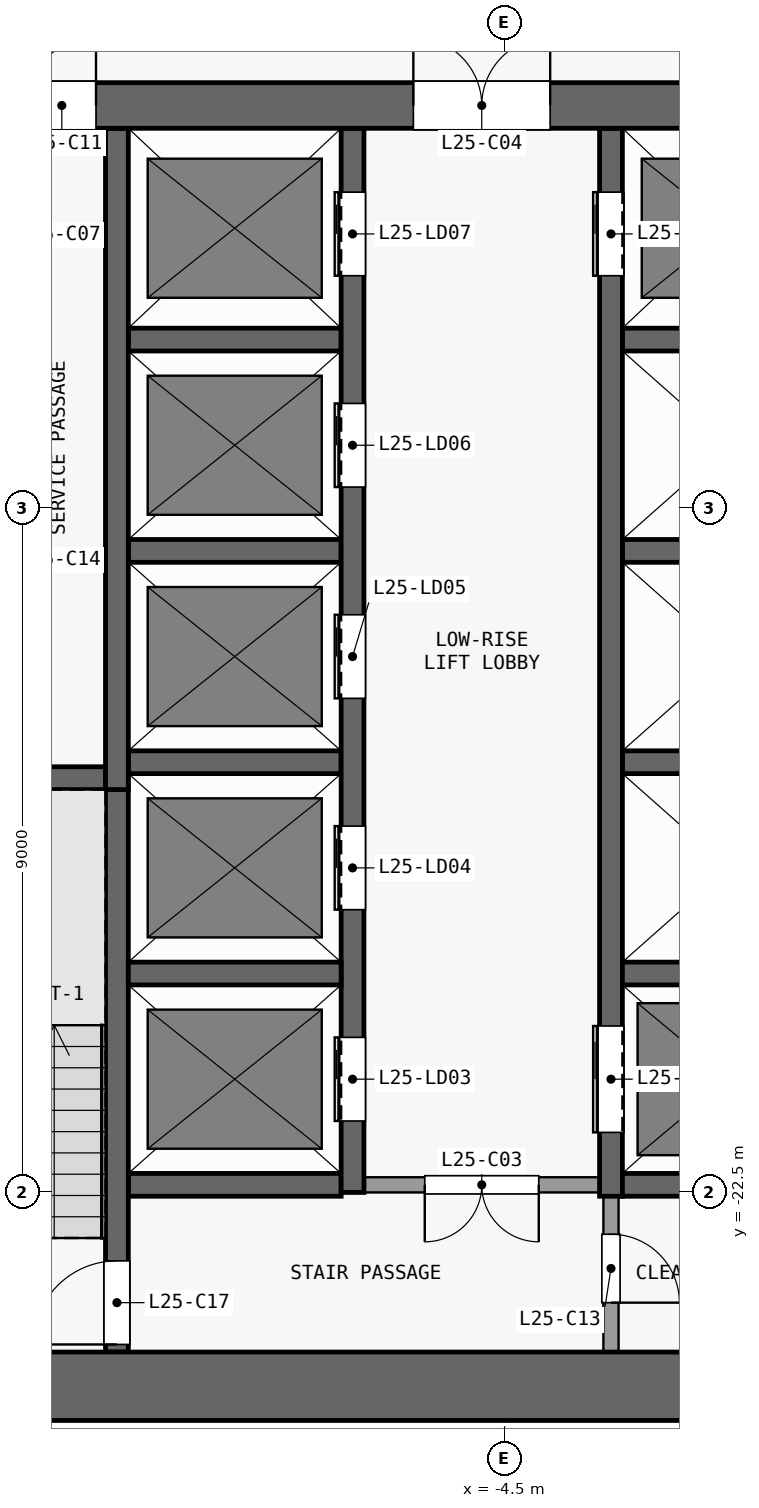
"""IFC4 building model, lengths in metres.
Left out: names, types, materials, properties, quantities, classifications, styles, units other than length and angle.
Written with IfcOpenShell. Run it as: python <this file> out.ifc"""

import sys

from ifc_helpers import new_model, si_unit, direction, frame, frame_2d, origin, place, context, subcontext, project, spatial, rectangle, extrude, element, fill, save


model = new_model("IFC4")
c1 = context("Model", 3, precision=1e-05, world=origin(), true_north=direction((0.0, 1.0)))
c2 = subcontext(c1, "Body", "Model", "MODEL_VIEW")
j1 = project(units=[si_unit("LENGTHUNIT", "METRE"), si_unit("PLANEANGLEUNIT", "RADIAN")], contexts=[c1])
p1 = place(None, origin())
s1 = spatial("IfcSite", under=j1, at=p1, CompositionType="ELEMENT")
p2 = place(p1, origin())
s2 = spatial("IfcBuilding", under=s1, at=p2, CompositionType="ELEMENT")
p3 = place(p2, frame((0.0, 0.0, 102.7)))
s3 = spatial("IfcBuildingStorey", under=s2, at=p3, CompositionType="ELEMENT", Elevation=102.7)
p4 = place(p3, frame((-13.4, -25.05, 0.0), z_axis=(0.0, 0.0, 1.0), x_axis=(1.0, 0.0, 0.0)))
e1 = element("IfcWall", 1, at=p4, inside=s3, PredefinedType="SHEAR", context=c2, shape_type="SweptSolid", body=[
    extrude(rectangle(XDim=26.8, YDim=0.9, at=frame_2d((13.4, 0.0))), origin(), (0.0, 0.0, 1.0), 3.3),
])
p5 = place(p3, frame((-13.4, -8.2, 0.0), z_axis=(0.0, 0.0, 1.0), x_axis=(1.0, 0.0, 0.0)))
e2 = element("IfcWall", 2, at=p5, inside=s3, PredefinedType="SHEAR", context=c2, shape_type="SweptSolid", body=[
    extrude(rectangle(XDim=26.8, YDim=0.6, at=frame_2d((13.4, 0.0))), origin(), (0.0, 0.0, 1.0), 3.3),
])
p6 = place(p5, frame((7.7, 0.0, 0.0)))
e3 = element("IfcOpeningElement", 3, at=p6, cuts=e2, PredefinedType="OPENING", context=c2, shape_type="SweptSolid", body=[
    extrude(rectangle(XDim=1.8, YDim=2.1, at=frame_2d((0.9, 1.05))), frame((0.0, 0.31, 0.0), z_axis=(0.0, -1.0, 0.0), x_axis=(1.0, 0.0, 0.0)), (0.0, 0.0, 1.0), 0.62),
])
p7 = place(p5, frame((17.3, 0.0, 0.0)))
e4 = element("IfcOpeningElement", 4, at=p7, cuts=e2, PredefinedType="OPENING", context=c2, shape_type="SweptSolid", body=[
    extrude(rectangle(XDim=1.8, YDim=2.1, at=frame_2d((0.9, 1.05))), frame((0.0, 0.31, 0.0), z_axis=(0.0, -1.0, 0.0), x_axis=(1.0, 0.0, 0.0)), (0.0, 0.0, 1.0), 0.62),
])
p8 = place(p5, frame((2.625, 0.0, 0.0)))
e5 = element("IfcOpeningElement", 5, at=p8, cuts=e2, PredefinedType="OPENING", context=c2, shape_type="SweptSolid", body=[
    extrude(rectangle(XDim=0.9, YDim=2.1, at=frame_2d((0.45, 1.05))), frame((0.0, 0.31, 0.0), z_axis=(0.0, -1.0, 0.0), x_axis=(1.0, 0.0, 0.0)), (0.0, 0.0, 1.0), 0.62),
])
p9 = place(p5, frame((23.275, 0.0, 0.0)))
e6 = element("IfcOpeningElement", 6, at=p9, cuts=e2, PredefinedType="OPENING", context=c2, shape_type="SweptSolid", body=[
    extrude(rectangle(XDim=0.9, YDim=2.1, at=frame_2d((0.45, 1.05))), frame((0.0, 0.31, 0.0), z_axis=(0.0, -1.0, 0.0), x_axis=(1.0, 0.0, 0.0)), (0.0, 0.0, 1.0), 0.62),
])
p10 = place(p3, frame((-9.45, -22.4, 0.0), z_axis=(0.0, 0.0, 1.0), x_axis=(1.0, 0.0, 0.0)))
e7 = element("IfcWall", 7, at=p10, inside=s3, PredefinedType="SHEAR", context=c2, shape_type="SweptSolid", body=[
    extrude(rectangle(XDim=2.8, YDim=0.3, at=frame_2d((1.4, 0.0))), origin(), (0.0, 0.0, 1.0), 3.3),
])
p11 = place(p3, frame((-3.25, -22.4, 0.0), z_axis=(0.0, 0.0, 1.0), x_axis=(-1.0, 0.0, 0.0)))
e8 = element("IfcWall", 8, at=p11, inside=s3, PredefinedType="PARTITIONING", context=c2, shape_type="SweptSolid", body=[
    extrude(rectangle(XDim=3.1, YDim=0.2, at=frame_2d((1.55, 0.0))), origin(), (0.0, 0.0, 1.0), 3.3),
])
p12 = place(p11, frame((0.8, 0.0, 0.0)))
e9 = element("IfcOpeningElement", 9, at=p12, cuts=e8, PredefinedType="OPENING", context=c2, shape_type="SweptSolid", body=[
    extrude(rectangle(XDim=1.5, YDim=2.1, at=frame_2d((0.75, 1.05))), frame((0.0, 0.11, 0.0), z_axis=(0.0, -1.0, 0.0), x_axis=(1.0, 0.0, 0.0)), (0.0, 0.0, 1.0), 0.22),
])
p13 = place(p3, frame((-2.95, -22.4, 0.0), z_axis=(0.0, 0.0, 1.0), x_axis=(1.0, 0.0, 0.0)))
e10 = element("IfcWall", 10, at=p13, inside=s3, PredefinedType="SHEAR", context=c2, shape_type="SweptSolid", body=[
    extrude(rectangle(XDim=6.2, YDim=0.3, at=frame_2d((3.1, 0.0))), origin(), (0.0, 0.0, 1.0), 3.3),
])
for number, where, z_axis, x_axis in (
    (11, (-9.45, -19.62, 0.0), (0.0, 0.0, 1.0), (1.0, 0.0, 0.0)),
    (12, (-2.95, -19.62, 0.0), (0.0, 0.0, 1.0), (1.0, 0.0, 0.0)),
):
    element("IfcWall", number, at=place(p3, frame(where, z_axis=z_axis, x_axis=x_axis)), inside=s3, PredefinedType="SHEAR", context=c2, shape_type="SweptSolid", body=[
        extrude(rectangle(XDim=2.8, YDim=0.3, at=frame_2d((1.4, 0.0))), origin(), (0.0, 0.0, 1.0), 3.3),
    ])
p14 = place(p3, frame((-12.6, -17.05, 0.0), z_axis=(0.0, 0.0, 1.0), x_axis=(1.0, 0.0, 0.0)))
e13 = element("IfcWall", 13, at=p14, inside=s3, PredefinedType="SHEAR", context=c2, shape_type="SweptSolid", body=[
    extrude(rectangle(XDim=2.85, YDim=0.3, at=frame_2d((1.425, 0.0))), origin(), (0.0, 0.0, 1.0), 3.3),
])
for number, where, z_axis, x_axis in (
    (14, (-9.45, -16.84, 0.0), (0.0, 0.0, 1.0), (1.0, 0.0, 0.0)),
    (15, (-2.95, -16.84, 0.0), (0.0, 0.0, 1.0), (1.0, 0.0, 0.0)),
    (16, (-9.45, -14.06, 0.0), (0.0, 0.0, 1.0), (1.0, 0.0, 0.0)),
    (17, (-2.95, -14.06, 0.0), (0.0, 0.0, 1.0), (1.0, 0.0, 0.0)),
    (18, (-9.45, -11.28, 0.0), (0.0, 0.0, 1.0), (1.0, 0.0, 0.0)),
    (19, (-2.95, -11.28, 0.0), (0.0, 0.0, 1.0), (1.0, 0.0, 0.0)),
):
    element("IfcWall", number, at=place(p3, frame(where, z_axis=z_axis, x_axis=x_axis)), inside=s3, PredefinedType="SHEAR", context=c2, shape_type="SweptSolid", body=[
        extrude(rectangle(XDim=2.8, YDim=0.3, at=frame_2d((1.4, 0.0))), origin(), (0.0, 0.0, 1.0), 3.3),
    ])
p15 = place(p3, frame((-9.6, -24.6, 0.0), z_axis=(0.0, 0.0, 1.0), x_axis=(0.0, 1.0, 0.0)))
e20 = element("IfcWall", 20, at=p15, inside=s3, PredefinedType="SHEAR", context=c2, shape_type="SweptSolid", body=[
    extrude(rectangle(XDim=7.7, YDim=0.3, at=frame_2d((3.85, 0.0))), origin(), (0.0, 0.0, 1.0), 3.3),
])
p16 = place(p15, frame((0.1, 0.0, 0.0)))
e21 = element("IfcOpeningElement", 21, at=p16, cuts=e20, PredefinedType="OPENING", context=c2, shape_type="SweptSolid", body=[
    extrude(rectangle(XDim=1.1, YDim=2.1, at=frame_2d((0.55, 1.05))), frame((0.0, 0.16, 0.0), z_axis=(0.0, -1.0, 0.0), x_axis=(1.0, 0.0, 0.0)), (0.0, 0.0, 1.0), 0.32),
])
p17 = place(p3, frame((-9.6, -17.2, 0.0), z_axis=(0.0, 0.0, 1.0), x_axis=(0.0, 1.0, 0.0)))
e22 = element("IfcWall", 22, at=p17, inside=s3, PredefinedType="SHEAR", context=c2, shape_type="SweptSolid", body=[
    extrude(rectangle(XDim=8.7, YDim=0.3, at=frame_2d((4.35, 0.0))), origin(), (0.0, 0.0, 1.0), 3.3),
])
p18 = place(p3, frame((-6.5, -22.5, 0.0), z_axis=(0.0, 0.0, 1.0), x_axis=(0.0, 1.0, 0.0)))
e23 = element("IfcWall", 23, at=p18, inside=s3, PredefinedType="SHEAR", context=c2, shape_type="SweptSolid", body=[
    extrude(rectangle(XDim=14.0, YDim=0.3, at=frame_2d((7.0, 0.0))), origin(), (0.0, 0.0, 1.0), 3.3),
])
p19 = place(p18, frame((0.94, 0.0, 0.0)))
e24 = element("IfcOpeningElement", 24, at=p19, cuts=e23, PredefinedType="OPENING", context=c2, shape_type="SweptSolid", body=[
    extrude(rectangle(XDim=1.1, YDim=2.1, at=frame_2d((0.55, 1.05))), frame((0.0, 0.16, 0.0), z_axis=(0.0, -1.0, 0.0), x_axis=(1.0, 0.0, 0.0)), (0.0, 0.0, 1.0), 0.32),
])
p20 = place(p18, frame((3.72, 0.0, 0.0)))
e25 = element("IfcOpeningElement", 25, at=p20, cuts=e23, PredefinedType="OPENING", context=c2, shape_type="SweptSolid", body=[
    extrude(rectangle(XDim=1.1, YDim=2.1, at=frame_2d((0.55, 1.05))), frame((0.0, 0.16, 0.0), z_axis=(0.0, -1.0, 0.0), x_axis=(1.0, 0.0, 0.0)), (0.0, 0.0, 1.0), 0.32),
])
p21 = place(p18, frame((6.5, 0.0, 0.0)))
e26 = element("IfcOpeningElement", 26, at=p21, cuts=e23, PredefinedType="OPENING", context=c2, shape_type="SweptSolid", body=[
    extrude(rectangle(XDim=1.1, YDim=2.1, at=frame_2d((0.55, 1.05))), frame((0.0, 0.16, 0.0), z_axis=(0.0, -1.0, 0.0), x_axis=(1.0, 0.0, 0.0)), (0.0, 0.0, 1.0), 0.32),
])
p22 = place(p18, frame((9.28, 0.0, 0.0)))
e27 = element("IfcOpeningElement", 27, at=p22, cuts=e23, PredefinedType="OPENING", context=c2, shape_type="SweptSolid", body=[
    extrude(rectangle(XDim=1.1, YDim=2.1, at=frame_2d((0.55, 1.05))), frame((0.0, 0.16, 0.0), z_axis=(0.0, -1.0, 0.0), x_axis=(1.0, 0.0, 0.0)), (0.0, 0.0, 1.0), 0.32),
])
p23 = place(p18, frame((12.06, 0.0, 0.0)))
e28 = element("IfcOpeningElement", 28, at=p23, cuts=e23, PredefinedType="OPENING", context=c2, shape_type="SweptSolid", body=[
    extrude(rectangle(XDim=1.1, YDim=2.1, at=frame_2d((0.55, 1.05))), frame((0.0, 0.16, 0.0), z_axis=(0.0, -1.0, 0.0), x_axis=(1.0, 0.0, 0.0)), (0.0, 0.0, 1.0), 0.32),
])
p24 = place(p3, frame((-3.1, -22.55, 0.0), z_axis=(0.0, 0.0, 1.0), x_axis=(0.0, -1.0, 0.0)))
e29 = element("IfcWall", 29, at=p24, inside=s3, PredefinedType="PARTITIONING", context=c2, shape_type="SweptSolid", body=[
    extrude(rectangle(XDim=2.05, YDim=0.2, at=frame_2d((1.025, 0.0))), origin(), (0.0, 0.0, 1.0), 3.3),
])
p25 = place(p24, frame((0.5, 0.0, 0.0)))
e30 = element("IfcOpeningElement", 30, at=p25, cuts=e29, PredefinedType="OPENING", context=c2, shape_type="SweptSolid", body=[
    extrude(rectangle(XDim=0.9, YDim=2.1, at=frame_2d((0.45, 1.05))), frame((0.0, 0.11, 0.0), z_axis=(0.0, -1.0, 0.0), x_axis=(1.0, 0.0, 0.0)), (0.0, 0.0, 1.0), 0.22),
])
p26 = place(p3, frame((-3.1, -22.55, 0.0), z_axis=(0.0, 0.0, 1.0), x_axis=(0.0, 1.0, 0.0)))
e31 = element("IfcWall", 31, at=p26, inside=s3, PredefinedType="SHEAR", context=c2, shape_type="SweptSolid", body=[
    extrude(rectangle(XDim=14.05, YDim=0.3, at=frame_2d((7.025, 0.0))), origin(), (0.0, 0.0, 1.0), 3.3),
])
p27 = place(p26, frame((12.11, 0.0, 0.0)))
e32 = element("IfcOpeningElement", 32, at=p27, cuts=e31, PredefinedType="OPENING", context=c2, shape_type="SweptSolid", body=[
    extrude(rectangle(XDim=1.1, YDim=2.1, at=frame_2d((0.55, 1.05))), frame((0.0, 0.16, 0.0), z_axis=(0.0, -1.0, 0.0), x_axis=(1.0, 0.0, 0.0)), (0.0, 0.0, 1.0), 0.32),
])
p28 = place(p26, frame((0.84, 0.0, 0.0)))
e33 = element("IfcOpeningElement", 33, at=p28, cuts=e31, PredefinedType="OPENING", context=c2, shape_type="SweptSolid", body=[
    extrude(rectangle(XDim=1.4, YDim=2.1, at=frame_2d((0.7, 1.05))), frame((0.0, 0.16, 0.0), z_axis=(0.0, -1.0, 0.0), x_axis=(1.0, 0.0, 0.0)), (0.0, 0.0, 1.0), 0.32),
])
p29 = place(p19, origin())
e34 = element("IfcDoor", 34, at=p29, inside=s3, OperationType="DOUBLE_DOOR_SLIDING", PredefinedType="DOOR", context=c2, shape_type="SweptSolid", body=[
    extrude(rectangle(XDim=1.1, YDim=2.1, at=frame_2d((0.55, 1.05))), frame((0.0, 0.025, 0.0), z_axis=(0.0, -1.0, 0.0), x_axis=(1.0, 0.0, 0.0)), (0.0, 0.0, 1.0), 0.05),
])
fill(e24, e34)
p30 = place(p20, origin())
e35 = element("IfcDoor", 35, at=p30, inside=s3, OperationType="DOUBLE_DOOR_SLIDING", PredefinedType="DOOR", context=c2, shape_type="SweptSolid", body=[
    extrude(rectangle(XDim=1.1, YDim=2.1, at=frame_2d((0.55, 1.05))), frame((0.0, 0.025, 0.0), z_axis=(0.0, -1.0, 0.0), x_axis=(1.0, 0.0, 0.0)), (0.0, 0.0, 1.0), 0.05),
])
fill(e25, e35)
p31 = place(p21, origin())
e36 = element("IfcDoor", 36, at=p31, inside=s3, OperationType="DOUBLE_DOOR_SLIDING", PredefinedType="DOOR", context=c2, shape_type="SweptSolid", body=[
    extrude(rectangle(XDim=1.1, YDim=2.1, at=frame_2d((0.55, 1.05))), frame((0.0, 0.025, 0.0), z_axis=(0.0, -1.0, 0.0), x_axis=(1.0, 0.0, 0.0)), (0.0, 0.0, 1.0), 0.05),
])
fill(e26, e36)
p32 = place(p22, origin())
e37 = element("IfcDoor", 37, at=p32, inside=s3, OperationType="DOUBLE_DOOR_SLIDING", PredefinedType="DOOR", context=c2, shape_type="SweptSolid", body=[
    extrude(rectangle(XDim=1.1, YDim=2.1, at=frame_2d((0.55, 1.05))), frame((0.0, 0.025, 0.0), z_axis=(0.0, -1.0, 0.0), x_axis=(1.0, 0.0, 0.0)), (0.0, 0.0, 1.0), 0.05),
])
fill(e27, e37)
p33 = place(p23, origin())
e38 = element("IfcDoor", 38, at=p33, inside=s3, OperationType="DOUBLE_DOOR_SLIDING", PredefinedType="DOOR", context=c2, shape_type="SweptSolid", body=[
    extrude(rectangle(XDim=1.1, YDim=2.1, at=frame_2d((0.55, 1.05))), frame((0.0, 0.025, 0.0), z_axis=(0.0, -1.0, 0.0), x_axis=(1.0, 0.0, 0.0)), (0.0, 0.0, 1.0), 0.05),
])
fill(e28, e38)
p34 = place(p27, origin())
e39 = element("IfcDoor", 39, at=p34, inside=s3, OperationType="DOUBLE_DOOR_SLIDING", PredefinedType="DOOR", context=c2, shape_type="SweptSolid", body=[
    extrude(rectangle(XDim=1.1, YDim=2.1, at=frame_2d((0.55, 1.05))), frame((0.0, 0.025, 0.0), z_axis=(0.0, -1.0, 0.0), x_axis=(1.0, 0.0, 0.0)), (0.0, 0.0, 1.0), 0.05),
])
fill(e32, e39)
p35 = place(p28, origin())
e40 = element("IfcDoor", 40, at=p35, inside=s3, OperationType="DOUBLE_DOOR_SLIDING", PredefinedType="DOOR", context=c2, shape_type="SweptSolid", body=[
    extrude(rectangle(XDim=1.4, YDim=2.1, at=frame_2d((0.7, 1.05))), frame((0.0, 0.025, 0.0), z_axis=(0.0, -1.0, 0.0), x_axis=(1.0, 0.0, 0.0)), (0.0, 0.0, 1.0), 0.05),
])
fill(e33, e40)
p36 = place(p12, origin())
e41 = element("IfcDoor", 41, at=p36, inside=s3, OperationType="DOUBLE_DOOR_SINGLE_SWING", PredefinedType="DOOR", context=c2, shape_type="SweptSolid", body=[
    extrude(rectangle(XDim=1.5, YDim=2.1, at=frame_2d((0.75, 1.05))), frame((0.0, 0.025, 0.0), z_axis=(0.0, -1.0, 0.0), x_axis=(1.0, 0.0, 0.0)), (0.0, 0.0, 1.0), 0.05),
])
fill(e9, e41)
p37 = place(p6, origin())
e42 = element("IfcDoor", 42, at=p37, inside=s3, OperationType="DOUBLE_DOOR_SINGLE_SWING", PredefinedType="DOOR", context=c2, shape_type="SweptSolid", body=[
    extrude(rectangle(XDim=1.8, YDim=2.1, at=frame_2d((0.9, 1.05))), frame((0.0, 0.025, 0.0), z_axis=(0.0, -1.0, 0.0), x_axis=(1.0, 0.0, 0.0)), (0.0, 0.0, 1.0), 0.05),
])
fill(e3, e42)
p38 = place(p8, origin())
e43 = element("IfcDoor", 43, at=p38, inside=s3, OperationType="SINGLE_SWING_RIGHT", PredefinedType="DOOR", context=c2, shape_type="SweptSolid", body=[
    extrude(rectangle(XDim=0.9, YDim=2.1, at=frame_2d((0.45, 1.05))), frame((0.0, 0.025, 0.0), z_axis=(0.0, -1.0, 0.0), x_axis=(1.0, 0.0, 0.0)), (0.0, 0.0, 1.0), 0.05),
])
fill(e5, e43)
p39 = place(p25, origin())
e44 = element("IfcDoor", 44, at=p39, inside=s3, OperationType="SINGLE_SWING_RIGHT", PredefinedType="DOOR", context=c2, shape_type="SweptSolid", body=[
    extrude(rectangle(XDim=0.9, YDim=2.1, at=frame_2d((0.45, 1.05))), frame((0.0, 0.025, 0.0), z_axis=(0.0, -1.0, 0.0), x_axis=(1.0, 0.0, 0.0)), (0.0, 0.0, 1.0), 0.05),
])
fill(e30, e44)
p40 = place(p16, origin())
e45 = element("IfcDoor", 45, at=p40, inside=s3, OperationType="SINGLE_SWING_LEFT", PredefinedType="DOOR", context=c2, shape_type="SweptSolid", body=[
    extrude(rectangle(XDim=1.1, YDim=2.1, at=frame_2d((0.55, 1.05))), frame((0.0, 0.025, 0.0), z_axis=(0.0, -1.0, 0.0), x_axis=(1.0, 0.0, 0.0)), (0.0, 0.0, 1.0), 0.05),
])
fill(e21, e45)
save(model, sys.argv[1])
